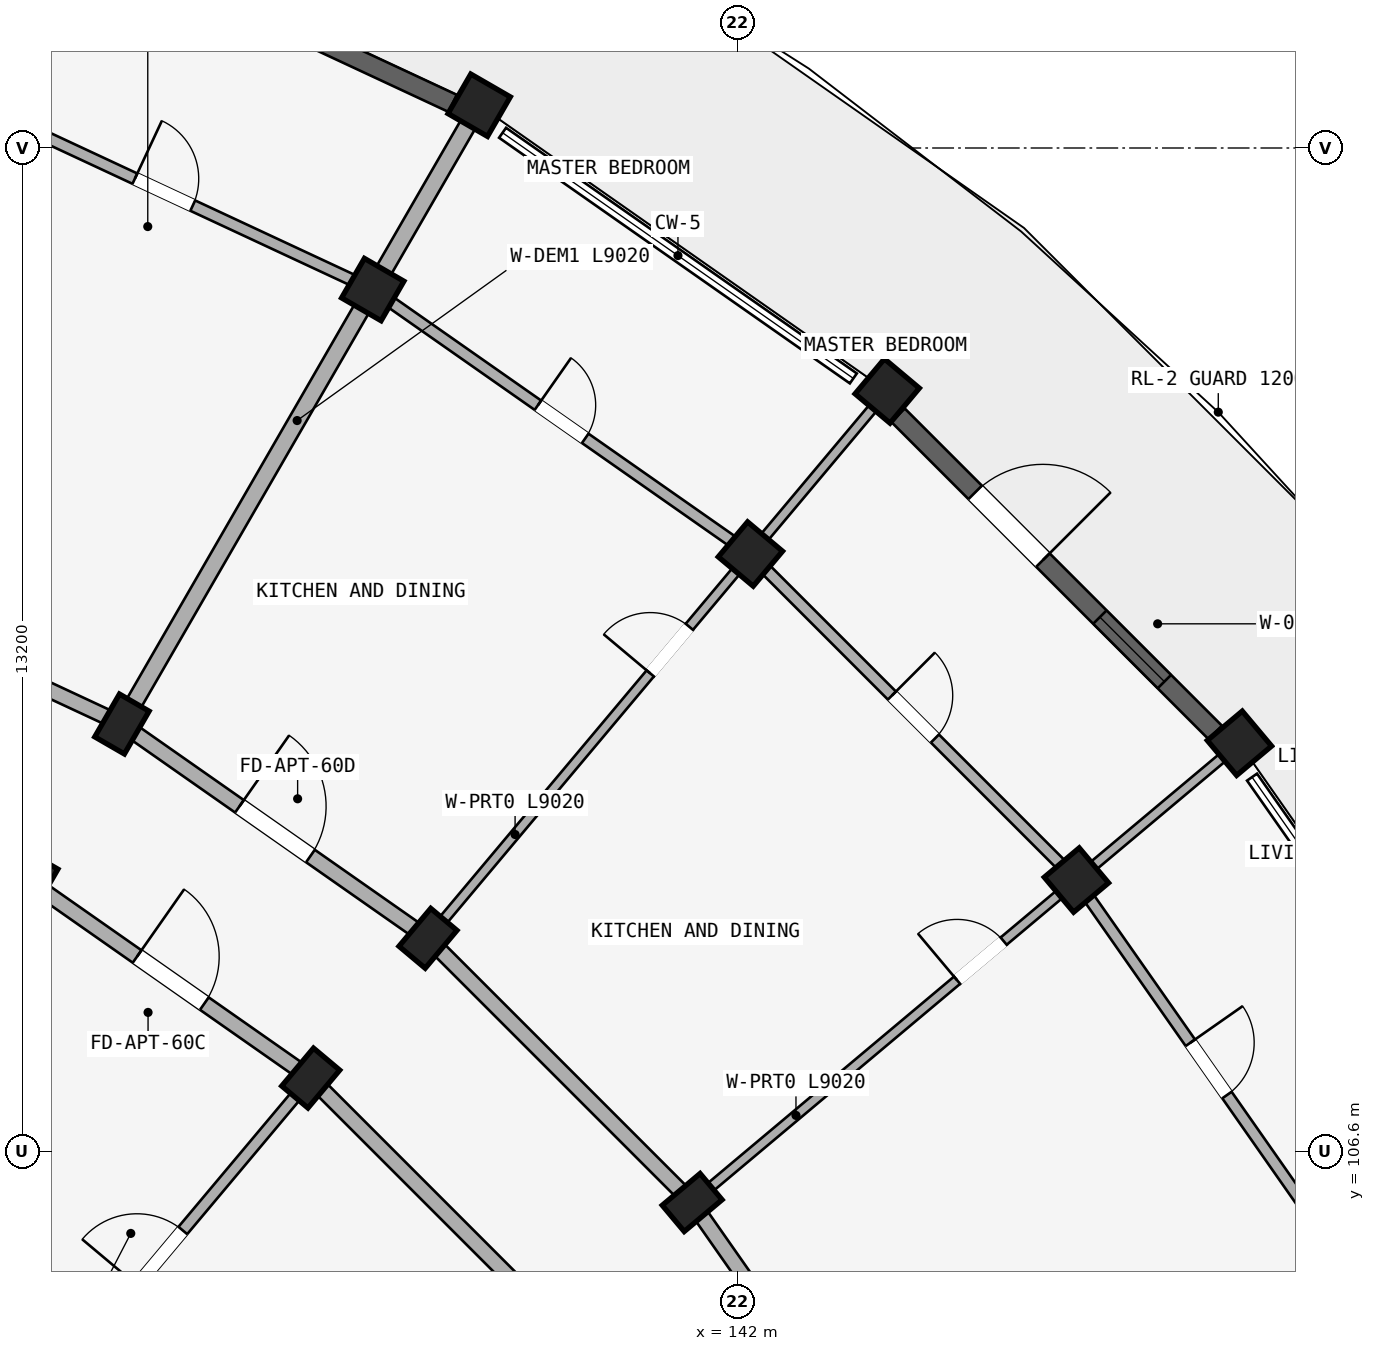
"""IFC4 building model, lengths in metres.
Left out: names, types, materials, properties, quantities, classifications, styles, units other than length and angle.
Written with IfcOpenShell. Run it as: python <this file> out.ifc"""

import sys

from ifc_helpers import new_model, si_unit, direction, frame, frame_2d, origin, origin_2d, place, context, subcontext, project, spatial, rectangle, extrude, element, fill, save


model = new_model("IFC4")
c1 = context("Model", 3, precision=1e-05, world=origin(), true_north=direction((0.0, 1.0)))
c2 = subcontext(c1, "Body", "Model", "MODEL_VIEW")
j1 = project(units=[si_unit("LENGTHUNIT", "METRE"), si_unit("PLANEANGLEUNIT", "RADIAN")], contexts=[c1])
p1 = place(None, origin())
s1 = spatial("IfcSite", under=j1, at=p1, CompositionType="ELEMENT")
p2 = place(p1, origin())
s2 = spatial("IfcBuilding", under=s1, at=p2, CompositionType="ELEMENT")
p3 = place(p2, frame((0.0, 0.0, 37.05)))
s3 = spatial("IfcBuildingStorey", under=s2, at=p3, CompositionType="ELEMENT", Elevation=37.05)
for number, where, z_axis, x_axis in (
    (1, (132.7, 110.144, 0.0), (0.0, 0.0, 1.0), (-0.866, 0.5, 0.0)),
    (2, (133.9, 112.222, 0.0), (0.0, 0.0, 1.0), (-0.866, 0.5, 0.0)),
):
    element("IfcColumn", number, at=place(p3, frame(where, z_axis=z_axis, x_axis=x_axis)), inside=s3, PredefinedType="COLUMN", context=c2, shape_type="SweptSolid", body=[
        extrude(rectangle(XDim=0.45, YDim=0.65, at=origin_2d()), origin(), (0.0, 0.0, 1.0), 2.93),
    ])
p4 = place(p3, frame((137.2, 117.938, 0.0), z_axis=(0.0, 0.0, 1.0), x_axis=(-0.866025403784, 0.5, 0.0)))
e3 = element("IfcColumn", 3, at=p4, inside=s3, PredefinedType="COLUMN", context=c2, shape_type="SweptSolid", body=[
    extrude(rectangle(XDim=0.6, YDim=0.6, at=origin_2d()), origin(), (0.0, 0.0, 1.0), 2.93),
])
p5 = place(p3, frame((138.6, 120.363, 0.0), z_axis=(0.0, 0.0, 1.0), x_axis=(-0.866025403784, 0.5, 0.0)))
e4 = element("IfcColumn", 4, at=p5, inside=s3, PredefinedType="COLUMN", context=c2, shape_type="SweptSolid", body=[
    extrude(rectangle(XDim=0.6, YDim=0.6, at=origin_2d()), origin(), (0.0, 0.0, 1.0), 2.97),
])
for number, where, z_axis, x_axis in (
    (5, (136.384, 107.564, 0.0), (0.0, 0.0, 1.0), (-0.766, 0.643, 0.0)),
    (6, (137.927, 109.402, 0.0), (0.0, 0.0, 1.0), (-0.766, 0.643, 0.0)),
):
    element("IfcColumn", number, at=place(p3, frame(where, z_axis=z_axis, x_axis=x_axis)), inside=s3, PredefinedType="COLUMN", context=c2, shape_type="SweptSolid", body=[
        extrude(rectangle(XDim=0.45, YDim=0.65, at=origin_2d()), origin(), (0.0, 0.0, 1.0), 2.93),
    ])
p6 = place(p3, frame((142.169, 114.458, 0.0), z_axis=(0.0, 0.0, 1.0), x_axis=(-0.766044443119, 0.642787609687, 0.0)))
e7 = element("IfcColumn", 7, at=p6, inside=s3, PredefinedType="COLUMN", context=c2, shape_type="SweptSolid", body=[
    extrude(rectangle(XDim=0.6, YDim=0.6, at=origin_2d()), origin(), (0.0, 0.0, 1.0), 2.93),
])
p7 = place(p3, frame((143.969, 116.603, 0.0), z_axis=(0.0, 0.0, 1.0), x_axis=(-0.766044443119, 0.642787609687, 0.0)))
e8 = element("IfcColumn", 8, at=p7, inside=s3, PredefinedType="COLUMN", context=c2, shape_type="SweptSolid", body=[
    extrude(rectangle(XDim=0.6, YDim=0.6, at=origin_2d()), origin(), (0.0, 0.0, 1.0), 2.97),
])
p8 = place(p3, frame((141.402, 105.927, 0.0), z_axis=(0.0, 0.0, 1.0), x_axis=(-0.642787609687, 0.766044443119, 0.0)))
e9 = element("IfcColumn", 9, at=p8, inside=s3, PredefinedType="COLUMN", context=c2, shape_type="SweptSolid", body=[
    extrude(rectangle(XDim=0.45, YDim=0.65, at=origin_2d()), origin(), (0.0, 0.0, 1.0), 2.93),
])
p9 = place(p3, frame((146.458, 110.169, 0.0), z_axis=(0.0, 0.0, 1.0), x_axis=(-0.642787609687, 0.766044443119, 0.0)))
e10 = element("IfcColumn", 10, at=p9, inside=s3, PredefinedType="COLUMN", context=c2, shape_type="SweptSolid", body=[
    extrude(rectangle(XDim=0.6, YDim=0.6, at=origin_2d()), origin(), (0.0, 0.0, 1.0), 2.93),
])
p10 = place(p3, frame((148.603, 111.969, 0.0), z_axis=(0.0, 0.0, 1.0), x_axis=(-0.642787609687, 0.766044443119, 0.0)))
e11 = element("IfcColumn", 11, at=p10, inside=s3, PredefinedType="COLUMN", context=c2, shape_type="SweptSolid", body=[
    extrude(rectangle(XDim=0.6, YDim=0.6, at=origin_2d()), origin(), (0.0, 0.0, 1.0), 2.97),
])
p11 = place(p3, frame((129.445, 114.299, 0.0), z_axis=(0.0, 0.0, 1.0), x_axis=(0.906302381024, -0.422629854778, 0.0)))
e12 = element("IfcWall", 12, at=p11, inside=s3, PredefinedType="STANDARD", context=c2, shape_type="SweptSolid", body=[
    extrude(rectangle(XDim=4.915, YDim=0.2, at=frame_2d((2.458, 0.0))), origin(), (0.0, 0.0, 1.0), 2.372),
])
p12 = place(p11, frame((1.918, 0.0, 0.0)))
e13 = element("IfcOpeningElement", 13, at=p12, cuts=e12, PredefinedType="OPENING", context=c2, shape_type="SweptSolid", body=[
    extrude(rectangle(XDim=1.08, YDim=2.15, at=frame_2d((0.54, 1.075))), frame((0.0, 0.11, 0.0), z_axis=(0.0, -1.0, 0.0), x_axis=(1.0, 0.0, 0.0)), (0.0, 0.0, 1.0), 0.22),
])
p13 = place(p3, frame((132.7, 110.144, 0.0), z_axis=(0.0, 0.0, 1.0), x_axis=(0.819155404658, -0.573571637217, 0.0)))
e14 = element("IfcWall", 14, at=p13, inside=s3, PredefinedType="STANDARD", context=c2, shape_type="SweptSolid", body=[
    extrude(rectangle(XDim=4.497, YDim=0.2, at=frame_2d((2.249, 0.0))), origin(), (0.0, 0.0, 1.0), 2.372),
])
p14 = place(p13, frame((1.709, 0.0, 0.0)))
e15 = element("IfcOpeningElement", 15, at=p14, cuts=e14, PredefinedType="OPENING", context=c2, shape_type="SweptSolid", body=[
    extrude(rectangle(XDim=1.08, YDim=2.15, at=frame_2d((0.54, 1.075))), frame((0.0, 0.11, 0.0), z_axis=(0.0, -1.0, 0.0), x_axis=(1.0, 0.0, 0.0)), (0.0, 0.0, 1.0), 0.22),
])
p15 = place(p3, frame((133.9, 112.222, 0.0), z_axis=(0.0, 0.0, 1.0), x_axis=(0.819140911474, -0.573592335331, 0.0)))
e16 = element("IfcWall", 16, at=p15, inside=s3, PredefinedType="STANDARD", context=c2, shape_type="SweptSolid", body=[
    extrude(rectangle(XDim=4.916, YDim=0.2, at=frame_2d((2.458, 0.0))), origin(), (0.0, 0.0, 1.0), 2.372),
])
p16 = place(p15, frame((1.888, 0.0, 0.0)))
e17 = element("IfcOpeningElement", 17, at=p16, cuts=e16, PredefinedType="OPENING", context=c2, shape_type="SweptSolid", body=[
    extrude(rectangle(XDim=1.14, YDim=2.15, at=frame_2d((0.57, 1.075))), frame((0.0, 0.11, 0.0), z_axis=(0.0, -1.0, 0.0), x_axis=(1.0, 0.0, 0.0)), (0.0, 0.0, 1.0), 0.22),
])
p17 = place(p3, frame((136.384, 107.564, 0.0), z_axis=(0.0, 0.0, 1.0), x_axis=(0.707106781187, -0.707106781187, 0.0)))
e18 = element("IfcWall", 18, at=p17, inside=s3, PredefinedType="STANDARD", context=c2, shape_type="SweptSolid", body=[
    extrude(rectangle(XDim=4.497, YDim=0.2, at=frame_2d((2.249, 0.0))), origin(), (0.0, 0.0, 1.0), 2.372),
])
p18 = place(p3, frame((137.927, 109.402, 0.0), z_axis=(0.0, 0.0, 1.0), x_axis=(0.707106781187, -0.707106781187, 0.0)))
e19 = element("IfcWall", 19, at=p18, inside=s3, PredefinedType="STANDARD", context=c2, shape_type="SweptSolid", body=[
    extrude(rectangle(XDim=4.916, YDim=0.2, at=frame_2d((2.458, 0.0))), origin(), (0.0, 0.0, 1.0), 2.372),
])
p19 = place(p3, frame((141.402, 105.927, 0.0), z_axis=(0.0, 0.0, 1.0), x_axis=(0.573592335331, -0.819140911474, 0.0)))
e20 = element("IfcWall", 20, at=p19, inside=s3, PredefinedType="STANDARD", context=c2, shape_type="SweptSolid", body=[
    extrude(rectangle(XDim=4.916, YDim=0.2, at=frame_2d((2.458, 0.0))), origin(), (0.0, 0.0, 1.0), 2.372),
])
p20 = place(p3, frame((133.95, 112.309, 0.0), z_axis=(0.0, 0.0, 1.0), x_axis=(0.500002045973, 0.866024222538, 0.0)))
e21 = element("IfcWall", 21, at=p20, inside=s3, PredefinedType="STANDARD", context=c2, shape_type="SweptSolid", body=[
    extrude(rectangle(XDim=9.02, YDim=0.22, at=frame_2d((4.51, 0.0))), origin(), (0.0, 0.0, 1.0), 2.372),
])
p21 = place(p3, frame((132.013, 102.355, 0.0), z_axis=(0.0, 0.0, 1.0), x_axis=(0.642784846501, 0.766046761698, 0.0)))
e22 = element("IfcWall", 22, at=p21, inside=s3, PredefinedType="PARTITIONING", context=c2, shape_type="SweptSolid", body=[
    extrude(rectangle(XDim=6.75, YDim=0.15, at=frame_2d((3.375, 0.0))), origin(), (0.0, 0.0, 1.0), 2.372),
])
p22 = place(p21, frame((3.242, 0.0, 0.0)))
e23 = element("IfcOpeningElement", 23, at=p22, cuts=e22, PredefinedType="OPENING", context=c2, shape_type="SweptSolid", body=[
    extrude(rectangle(XDim=0.94, YDim=2.1, at=frame_2d((0.47, 1.05))), frame((0.0, 0.085, 0.0), z_axis=(0.0, -1.0, 0.0), x_axis=(1.0, 0.0, 0.0)), (0.0, 0.0, 1.0), 0.17),
])
p23 = place(p3, frame((137.991, 109.479, 0.0), z_axis=(0.0, 0.0, 1.0), x_axis=(0.642784468535, 0.766047078847, 0.0)))
e24 = element("IfcWall", 24, at=p23, inside=s3, PredefinedType="PARTITIONING", context=c2, shape_type="SweptSolid", body=[
    extrude(rectangle(XDim=9.02, YDim=0.125, at=frame_2d((4.51, 0.0))), origin(), (0.0, 0.0, 1.0), 2.372),
])
p24 = place(p23, frame((4.45, 0.0, 0.0)))
e25 = element("IfcOpeningElement", 25, at=p24, cuts=e24, PredefinedType="OPENING", context=c2, shape_type="SweptSolid", body=[
    extrude(rectangle(XDim=0.8, YDim=2.1, at=frame_2d((0.4, 1.05))), frame((0.0, 0.073, 0.0), z_axis=(0.0, -1.0, 0.0), x_axis=(1.0, 0.0, 0.0)), (0.0, 0.0, 1.0), 0.145),
])
p25 = place(p3, frame((141.479, 105.991, 0.0), z_axis=(0.0, 0.0, 1.0), x_axis=(0.766047078847, 0.642784468535, 0.0)))
e26 = element("IfcWall", 26, at=p25, inside=s3, PredefinedType="PARTITIONING", context=c2, shape_type="SweptSolid", body=[
    extrude(rectangle(XDim=9.02, YDim=0.125, at=frame_2d((4.51, 0.0))), origin(), (0.0, 0.0, 1.0), 2.372),
])
p26 = place(p25, frame((4.45, 0.0, 0.0)))
e27 = element("IfcOpeningElement", 27, at=p26, cuts=e26, PredefinedType="OPENING", context=c2, shape_type="SweptSolid", body=[
    extrude(rectangle(XDim=0.8, YDim=2.1, at=frame_2d((0.4, 1.05))), frame((0.0, 0.073, 0.0), z_axis=(0.0, -1.0, 0.0), x_axis=(1.0, 0.0, 0.0)), (0.0, 0.0, 1.0), 0.145),
])
p27 = place(p3, frame((144.309, 101.95, 0.0), z_axis=(0.0, 0.0, 1.0), x_axis=(0.866024222538, 0.500002045973, 0.0)))
e28 = element("IfcWall", 28, at=p27, inside=s3, PredefinedType="STANDARD", context=c2, shape_type="SweptSolid", body=[
    extrude(rectangle(XDim=9.02, YDim=0.22, at=frame_2d((4.51, 0.0))), origin(), (0.0, 0.0, 1.0), 2.372),
])
p28 = place(p3, frame((131.702, 120.501, 0.0), z_axis=(0.0, 0.0, 1.0), x_axis=(0.906312656069, -0.42260781991, 0.0)))
e29 = element("IfcWall", 29, at=p28, inside=s3, PredefinedType="PLUMBINGWALL", context=c2, shape_type="SweptSolid", body=[
    extrude(rectangle(XDim=6.066, YDim=0.15, at=frame_2d((3.033, 0.0))), origin(), (0.0, 0.0, 1.0), 2.372),
])
p29 = place(p28, frame((2.613, 0.0, 0.0)))
e30 = element("IfcOpeningElement", 30, at=p29, cuts=e29, PredefinedType="OPENING", context=c2, shape_type="SweptSolid", body=[
    extrude(rectangle(XDim=0.84, YDim=2.1, at=frame_2d((0.42, 1.05))), frame((0.0, 0.085, 0.0), z_axis=(0.0, -1.0, 0.0), x_axis=(1.0, 0.0, 0.0)), (0.0, 0.0, 1.0), 0.17),
])
p30 = place(p3, frame((137.2, 117.938, 0.0), z_axis=(0.0, 0.0, 1.0), x_axis=(0.81913926159, -0.573594691504, 0.0)))
e31 = element("IfcWall", 31, at=p30, inside=s3, PredefinedType="PLUMBINGWALL", context=c2, shape_type="SweptSolid", body=[
    extrude(rectangle(XDim=6.066, YDim=0.15, at=frame_2d((3.033, 0.0))), origin(), (0.0, 0.0, 1.0), 2.372),
])
p31 = place(p30, frame((2.653, 0.0, 0.0)))
e32 = element("IfcOpeningElement", 32, at=p31, cuts=e31, PredefinedType="OPENING", context=c2, shape_type="SweptSolid", body=[
    extrude(rectangle(XDim=0.76, YDim=2.05, at=frame_2d((0.38, 1.025))), frame((0.0, 0.085, 0.0), z_axis=(0.0, -1.0, 0.0), x_axis=(1.0, 0.0, 0.0)), (0.0, 0.0, 1.0), 0.17),
])
p32 = place(p3, frame((142.169, 114.458, 0.0), z_axis=(0.0, 0.0, 1.0), x_axis=(0.707106781187, -0.707106781187, 0.0)))
e33 = element("IfcWall", 33, at=p32, inside=s3, PredefinedType="PLUMBINGWALL", context=c2, shape_type="SweptSolid", body=[
    extrude(rectangle(XDim=6.066, YDim=0.15, at=frame_2d((3.033, 0.0))), origin(), (0.0, 0.0, 1.0), 2.372),
])
p33 = place(p32, frame((2.633, 0.0, 0.0)))
e34 = element("IfcOpeningElement", 34, at=p33, cuts=e33, PredefinedType="OPENING", context=c2, shape_type="SweptSolid", body=[
    extrude(rectangle(XDim=0.8, YDim=2.1, at=frame_2d((0.4, 1.05))), frame((0.0, 0.085, 0.0), z_axis=(0.0, -1.0, 0.0), x_axis=(1.0, 0.0, 0.0)), (0.0, 0.0, 1.0), 0.17),
])
p34 = place(p3, frame((146.458, 110.169, 0.0), z_axis=(0.0, 0.0, 1.0), x_axis=(0.573594691504, -0.81913926159, 0.0)))
e35 = element("IfcWall", 35, at=p34, inside=s3, PredefinedType="PLUMBINGWALL", context=c2, shape_type="SweptSolid", body=[
    extrude(rectangle(XDim=6.066, YDim=0.15, at=frame_2d((3.033, 0.0))), origin(), (0.0, 0.0, 1.0), 2.372),
])
p35 = place(p34, frame((2.613, 0.0, 0.0)))
e36 = element("IfcOpeningElement", 36, at=p35, cuts=e35, PredefinedType="OPENING", context=c2, shape_type="SweptSolid", body=[
    extrude(rectangle(XDim=0.84, YDim=2.1, at=frame_2d((0.42, 1.05))), frame((0.0, 0.085, 0.0), z_axis=(0.0, -1.0, 0.0), x_axis=(1.0, 0.0, 0.0)), (0.0, 0.0, 1.0), 0.17),
])
p36 = place(p3, frame((132.902, 122.882, 0.0), z_axis=(0.0, 0.0, 1.0), x_axis=(0.906303563546, -0.422627318927, 0.0)))
e37 = element("IfcWall", 37, at=p36, inside=s3, PredefinedType="STANDARD", context=c2, shape_type="SweptSolid", body=[
    extrude(rectangle(XDim=5.903, YDim=0.25, at=frame_2d((2.951, 0.0))), origin(), (0.0, 0.0, 1.0), 2.412),
])
p37 = place(p36, frame((2.001, 0.0, 0.462)))
e38 = element("IfcOpeningElement", 38, at=p37, cuts=e37, PredefinedType="OPENING", context=c2, shape_type="SweptSolid", body=[
    extrude(rectangle(XDim=1.9, YDim=1.75, at=frame_2d((0.95, 0.875))), frame((0.0, 0.135, 0.0), z_axis=(0.0, -1.0, 0.0), x_axis=(1.0, 0.0, 0.0)), (0.0, 0.0, 1.0), 0.27),
])
p38 = place(p3, frame((144.111, 116.285, 0.0), z_axis=(0.0, 0.0, 1.0), x_axis=(0.707106781187, -0.707106781187, 0.0)))
e39 = element("IfcWall", 39, at=p38, inside=s3, PredefinedType="STANDARD", context=c2, shape_type="SweptSolid", body=[
    extrude(rectangle(XDim=5.903, YDim=0.25, at=frame_2d((2.952, 0.0))), origin(), (0.0, 0.0, 1.0), 2.412),
])
p39 = place(p38, frame((3.756, 0.0, 0.312)))
e40 = element("IfcOpeningElement", 40, at=p39, cuts=e39, PredefinedType="OPENING", context=c2, shape_type="SweptSolid", body=[
    extrude(rectangle(XDim=1.2, YDim=1.5, at=frame_2d((0.6, 0.75))), frame((0.0, 0.135, 0.0), z_axis=(0.0, -1.0, 0.0), x_axis=(1.0, 0.0, 0.0)), (0.0, 0.0, 1.0), 0.27),
])
p40 = place(p38, frame((1.436, 0.0, 0.0)))
e41 = element("IfcOpeningElement", 41, at=p40, cuts=e39, PredefinedType="OPENING", context=c2, shape_type="SweptSolid", body=[
    extrude(rectangle(XDim=1.26, YDim=2.15, at=frame_2d((0.63, 1.075))), frame((0.0, 0.135, 0.0), z_axis=(0.0, -1.0, 0.0), x_axis=(1.0, 0.0, 0.0)), (0.0, 0.0, 1.0), 0.27),
])
p41 = place(p39, origin())
e42 = element("IfcWindow", 42, at=p41, inside=s3, PartitioningType="SINGLE_PANEL", PredefinedType="WINDOW", context=c2, shape_type="SweptSolid", body=[
    extrude(rectangle(XDim=1.2, YDim=1.5, at=frame_2d((0.6, 0.75))), frame((0.0, 0.03, 0.0), z_axis=(0.0, -1.0, 0.0), x_axis=(1.0, 0.0, 0.0)), (0.0, 0.0, 1.0), 0.06),
])
fill(e40, e42)
p42 = place(p22, frame((0.94, 0.0, 0.0), z_axis=(0.0, 0.0, 1.0), x_axis=(-1.0, 0.0, 0.0)))
e43 = element("IfcDoor", 43, at=p42, inside=s3, OperationType="SINGLE_SWING_RIGHT", PredefinedType="DOOR", context=c2, shape_type="SweptSolid", body=[
    extrude(rectangle(XDim=0.94, YDim=2.1, at=frame_2d((0.47, 1.05))), frame((0.0, 0.025, 0.0), z_axis=(0.0, -1.0, 0.0), x_axis=(1.0, 0.0, 0.0)), (0.0, 0.0, 1.0), 0.05),
])
fill(e23, e43)
p43 = place(p24, origin())
e44 = element("IfcDoor", 44, at=p43, inside=s3, OperationType="SINGLE_SWING_LEFT", PredefinedType="DOOR", context=c2, shape_type="SweptSolid", body=[
    extrude(rectangle(XDim=0.8, YDim=2.1, at=frame_2d((0.4, 1.05))), frame((0.0, 0.025, 0.0), z_axis=(0.0, -1.0, 0.0), x_axis=(1.0, 0.0, 0.0)), (0.0, 0.0, 1.0), 0.05),
])
fill(e25, e44)
p44 = place(p26, frame((0.8, 0.0, 0.0), z_axis=(0.0, 0.0, 1.0), x_axis=(-1.0, 0.0, 0.0)))
e45 = element("IfcDoor", 45, at=p44, inside=s3, OperationType="SINGLE_SWING_RIGHT", PredefinedType="DOOR", context=c2, shape_type="SweptSolid", body=[
    extrude(rectangle(XDim=0.8, YDim=2.1, at=frame_2d((0.4, 1.05))), frame((0.0, 0.025, 0.0), z_axis=(0.0, -1.0, 0.0), x_axis=(1.0, 0.0, 0.0)), (0.0, 0.0, 1.0), 0.05),
])
fill(e27, e45)
p45 = place(p29, origin())
e46 = element("IfcDoor", 46, at=p45, inside=s3, OperationType="SINGLE_SWING_LEFT", PredefinedType="DOOR", context=c2, shape_type="SweptSolid", body=[
    extrude(rectangle(XDim=0.84, YDim=2.1, at=frame_2d((0.42, 1.05))), frame((0.0, 0.025, 0.0), z_axis=(0.0, -1.0, 0.0), x_axis=(1.0, 0.0, 0.0)), (0.0, 0.0, 1.0), 0.05),
])
fill(e30, e46)
p46 = place(p16, frame((1.14, 0.0, 0.0), z_axis=(0.0, 0.0, 1.0), x_axis=(-1.0, 0.0, 0.0)))
e47 = element("IfcDoor", 47, at=p46, inside=s3, OperationType="SINGLE_SWING_RIGHT", PredefinedType="DOOR", context=c2, shape_type="SweptSolid", body=[
    extrude(rectangle(XDim=1.14, YDim=2.15, at=frame_2d((0.57, 1.075))), frame((0.0, 0.025, 0.0), z_axis=(0.0, -1.0, 0.0), x_axis=(1.0, 0.0, 0.0)), (0.0, 0.0, 1.0), 0.05),
])
fill(e17, e47)
p47 = place(p31, origin())
e48 = element("IfcDoor", 48, at=p47, inside=s3, OperationType="SINGLE_SWING_LEFT", PredefinedType="DOOR", context=c2, shape_type="SweptSolid", body=[
    extrude(rectangle(XDim=0.76, YDim=2.05, at=frame_2d((0.38, 1.025))), frame((0.0, 0.025, 0.0), z_axis=(0.0, -1.0, 0.0), x_axis=(1.0, 0.0, 0.0)), (0.0, 0.0, 1.0), 0.05),
])
fill(e32, e48)
p48 = place(p33, frame((0.8, 0.0, 0.0), z_axis=(0.0, 0.0, 1.0), x_axis=(-1.0, 0.0, 0.0)))
e49 = element("IfcDoor", 49, at=p48, inside=s3, OperationType="SINGLE_SWING_RIGHT", PredefinedType="DOOR", context=c2, shape_type="SweptSolid", body=[
    extrude(rectangle(XDim=0.8, YDim=2.1, at=frame_2d((0.4, 1.05))), frame((0.0, 0.025, 0.0), z_axis=(0.0, -1.0, 0.0), x_axis=(1.0, 0.0, 0.0)), (0.0, 0.0, 1.0), 0.05),
])
fill(e34, e49)
p49 = place(p35, origin())
e50 = element("IfcDoor", 50, at=p49, inside=s3, OperationType="SINGLE_SWING_LEFT", PredefinedType="DOOR", context=c2, shape_type="SweptSolid", body=[
    extrude(rectangle(XDim=0.84, YDim=2.1, at=frame_2d((0.42, 1.05))), frame((0.0, 0.025, 0.0), z_axis=(0.0, -1.0, 0.0), x_axis=(1.0, 0.0, 0.0)), (0.0, 0.0, 1.0), 0.05),
])
fill(e36, e50)
p50 = place(p14, origin())
e51 = element("IfcDoor", 51, at=p50, inside=s3, OperationType="SINGLE_SWING_LEFT", PredefinedType="DOOR", context=c2, shape_type="SweptSolid", body=[
    extrude(rectangle(XDim=1.08, YDim=2.15, at=frame_2d((0.54, 1.075))), frame((0.0, 0.025, 0.0), z_axis=(0.0, -1.0, 0.0), x_axis=(1.0, 0.0, 0.0)), (0.0, 0.0, 1.0), 0.05),
])
fill(e15, e51)
p51 = place(p40, origin())
e52 = element("IfcDoor", 52, at=p51, inside=s3, OperationType="SINGLE_SWING_RIGHT", PredefinedType="DOOR", context=c2, shape_type="SweptSolid", body=[
    extrude(rectangle(XDim=1.26, YDim=2.15, at=frame_2d((0.63, 1.075))), frame((0.0, 0.025, 0.0), z_axis=(0.0, -1.0, 0.0), x_axis=(1.0, 0.0, 0.0)), (0.0, 0.0, 1.0), 0.05),
])
fill(e41, e52)
save(model, sys.argv[1])
